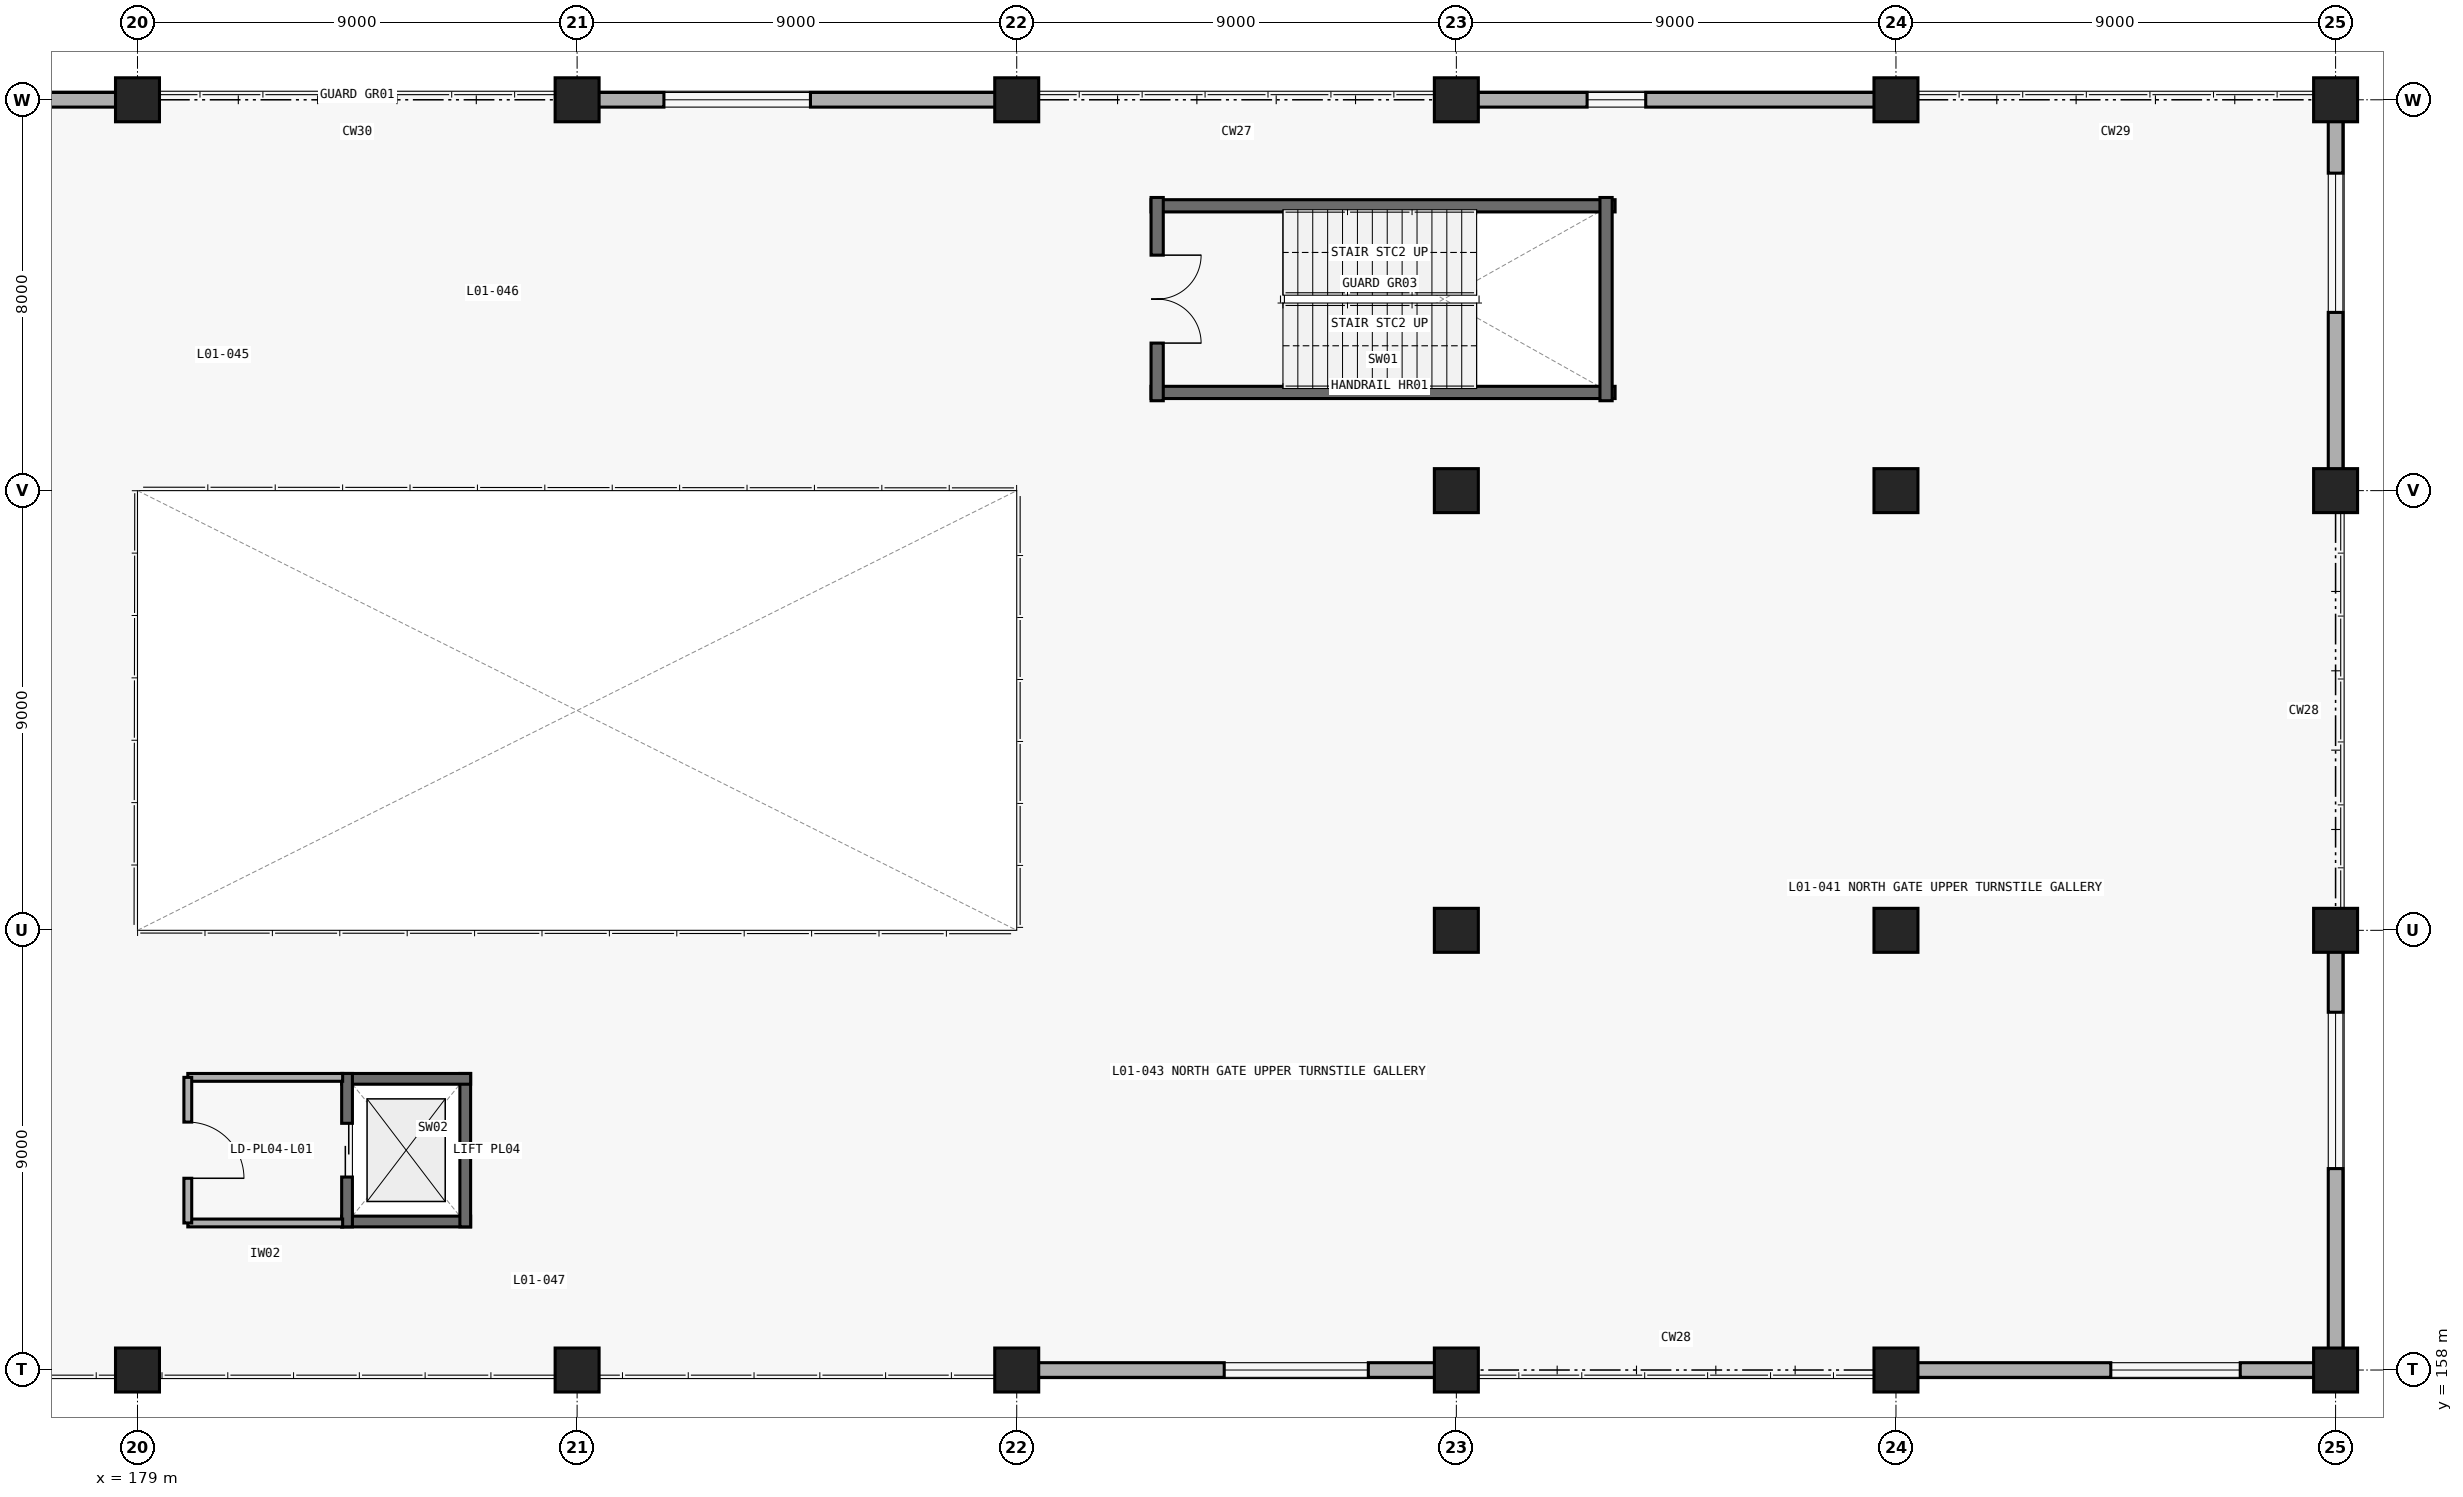
"""IFC4 building model, lengths in metres.
Left out: names, types, materials, properties, quantities, classifications, styles, units other than length and angle.
Written with IfcOpenShell. Run it as: python <this file> out.ifc"""

import sys

from ifc_helpers import new_model, si_unit, direction, frame, frame_2d, origin, origin_2d, place, context, subcontext, project, spatial, rectangle, extrude, element, fill, save


model = new_model("IFC4")
c1 = context("Model", 3, precision=1e-05, world=origin(), true_north=direction((0.0, 1.0)))
c2 = subcontext(c1, "Body", "Model", "MODEL_VIEW")
j1 = project(units=[si_unit("LENGTHUNIT", "METRE"), si_unit("PLANEANGLEUNIT", "RADIAN")], contexts=[c1])
p1 = place(None, origin())
s1 = spatial("IfcSite", under=j1, at=p1, CompositionType="ELEMENT")
p2 = place(p1, origin())
s2 = spatial("IfcBuilding", under=s1, at=p2, CompositionType="ELEMENT")
p3 = place(p2, frame((0.0, 0.0, 5.4)))
s3 = spatial("IfcBuildingStorey", under=s2, at=p3, CompositionType="ELEMENT", Elevation=5.4)
for number, where, z_axis, x_axis in (
    (1, (179.0, 158.0, 0.0), (0.0, 0.0, 1.0), (1.0, 0.0, 0.0)),
    (2, (179.0, 184.0, 0.0), (0.0, 0.0, 1.0), (1.0, 0.0, 0.0)),
    (3, (188.0, 158.0, 0.0), (0.0, 0.0, 1.0), (1.0, 0.0, 0.0)),
    (4, (188.0, 184.0, 0.0), (0.0, 0.0, 1.0), (1.0, 0.0, 0.0)),
    (5, (197.0, 158.0, 0.0), (0.0, 0.0, 1.0), (1.0, 0.0, 0.0)),
    (6, (197.0, 184.0, 0.0), (0.0, 0.0, 1.0), (1.0, 0.0, 0.0)),
    (7, (206.0, 158.0, 0.0), (0.0, 0.0, 1.0), (1.0, 0.0, 0.0)),
    (8, (206.0, 167.0, 0.0), (0.0, 0.0, 1.0), (1.0, 0.0, 0.0)),
    (9, (206.0, 176.0, 0.0), (0.0, 0.0, 1.0), (1.0, 0.0, 0.0)),
    (10, (206.0, 184.0, 0.0), (0.0, 0.0, 1.0), (1.0, 0.0, 0.0)),
    (11, (215.0, 158.0, 0.0), (0.0, 0.0, 1.0), (1.0, 0.0, 0.0)),
    (12, (215.0, 167.0, 0.0), (0.0, 0.0, 1.0), (1.0, 0.0, 0.0)),
    (13, (215.0, 176.0, 0.0), (0.0, 0.0, 1.0), (1.0, 0.0, 0.0)),
    (14, (215.0, 184.0, 0.0), (0.0, 0.0, 1.0), (1.0, 0.0, 0.0)),
    (15, (224.0, 158.0, 0.0), (0.0, 0.0, 1.0), (1.0, 0.0, 0.0)),
    (16, (224.0, 167.0, 0.0), (0.0, 0.0, 1.0), (1.0, 0.0, 0.0)),
    (17, (224.0, 176.0, 0.0), (0.0, 0.0, 1.0), (1.0, 0.0, 0.0)),
    (18, (224.0, 184.0, 0.0), (0.0, 0.0, 1.0), (1.0, 0.0, 0.0)),
):
    element("IfcColumn", number, at=place(p3, frame(where, z_axis=z_axis, x_axis=x_axis)), inside=s3, PredefinedType="COLUMN", context=c2, shape_type="SweptSolid", body=[
        extrude(rectangle(XDim=0.9, YDim=0.9, at=origin_2d()), origin(), (0.0, 0.0, 1.0), 4.8),
    ])
p4 = place(p3, frame((170.425, 184.0, 0.0), z_axis=(0.0, 0.0, 1.0), x_axis=(1.0, 0.0, 0.0)))
e19 = element("IfcWall", 19, at=p4, inside=s3, PredefinedType="STANDARD", context=c2, shape_type="SweptSolid", body=[
    extrude(rectangle(XDim=8.15, YDim=0.3, at=frame_2d((4.075, 0.0))), origin(), (0.0, 0.0, 1.0), 3.804),
])
p5 = place(p4, frame((2.102, 0.0, 0.95)))
e20 = element("IfcOpeningElement", 20, at=p5, cuts=e19, PredefinedType="OPENING", context=c2, shape_type="SweptSolid", body=[
    extrude(rectangle(XDim=1.5, YDim=2.0, at=frame_2d((0.75, 1.0))), frame((0.0, 0.16, 0.0), z_axis=(0.0, -1.0, 0.0), x_axis=(1.0, 0.0, 0.0)), (0.0, 0.0, 1.0), 0.32),
])
p6 = place(p3, frame((188.425, 184.0, 0.0), z_axis=(0.0, 0.0, 1.0), x_axis=(1.0, 0.0, 0.0)))
e21 = element("IfcWall", 21, at=p6, inside=s3, PredefinedType="STANDARD", context=c2, shape_type="SweptSolid", body=[
    extrude(rectangle(XDim=8.15, YDim=0.3, at=frame_2d((4.075, 0.0))), origin(), (0.0, 0.0, 1.0), 3.804),
])
p7 = place(p6, frame((1.352, 0.0, 0.95)))
e22 = element("IfcOpeningElement", 22, at=p7, cuts=e21, PredefinedType="OPENING", context=c2, shape_type="SweptSolid", body=[
    extrude(rectangle(XDim=3.0, YDim=2.3, at=frame_2d((1.5, 1.15))), frame((0.0, 0.16, 0.0), z_axis=(0.0, -1.0, 0.0), x_axis=(1.0, 0.0, 0.0)), (0.0, 0.0, 1.0), 0.32),
])
p8 = place(p3, frame((206.425, 184.0, 0.0), z_axis=(0.0, 0.0, 1.0), x_axis=(1.0, 0.0, 0.0)))
e23 = element("IfcWall", 23, at=p8, inside=s3, PredefinedType="STANDARD", context=c2, shape_type="SweptSolid", body=[
    extrude(rectangle(XDim=8.15, YDim=0.3, at=frame_2d((4.075, 0.0))), origin(), (0.0, 0.0, 1.0), 3.804),
])
p9 = place(p8, frame((2.252, 0.0, 0.95)))
e24 = element("IfcOpeningElement", 24, at=p9, cuts=e23, PredefinedType="OPENING", context=c2, shape_type="SweptSolid", body=[
    extrude(rectangle(XDim=1.2, YDim=1.8, at=frame_2d((0.6, 0.9))), frame((0.0, 0.16, 0.0), z_axis=(0.0, -1.0, 0.0), x_axis=(1.0, 0.0, 0.0)), (0.0, 0.0, 1.0), 0.32),
])
p10 = place(p3, frame((224.0, 183.575, 0.0), z_axis=(0.0, 0.0, 1.0), x_axis=(0.0, -1.0, 0.0)))
e25 = element("IfcWall", 25, at=p10, inside=s3, PredefinedType="STANDARD", context=c2, shape_type="SweptSolid", body=[
    extrude(rectangle(XDim=7.15, YDim=0.3, at=frame_2d((3.575, 0.0))), origin(), (0.0, 0.0, 1.0), 3.837),
])
p11 = place(p10, frame((1.077, 0.0, 0.95)))
e26 = element("IfcOpeningElement", 26, at=p11, cuts=e25, PredefinedType="OPENING", context=c2, shape_type="SweptSolid", body=[
    extrude(rectangle(XDim=2.85, YDim=2.35, at=frame_2d((1.425, 1.175))), frame((0.0, 0.16, 0.0), z_axis=(0.0, -1.0, 0.0), x_axis=(1.0, 0.0, 0.0)), (0.0, 0.0, 1.0), 0.32),
])
p12 = place(p3, frame((224.0, 166.575, 0.0), z_axis=(0.0, 0.0, 1.0), x_axis=(0.0, -1.0, 0.0)))
e27 = element("IfcWall", 27, at=p12, inside=s3, PredefinedType="STANDARD", context=c2, shape_type="SweptSolid", body=[
    extrude(rectangle(XDim=8.15, YDim=0.3, at=frame_2d((4.075, 0.0))), origin(), (0.0, 0.0, 1.0), 3.837),
])
p13 = place(p12, frame((1.252, 0.0, 0.95)))
e28 = element("IfcOpeningElement", 28, at=p13, cuts=e27, PredefinedType="OPENING", context=c2, shape_type="SweptSolid", body=[
    extrude(rectangle(XDim=3.2, YDim=2.1, at=frame_2d((1.6, 1.05))), frame((0.0, 0.16, 0.0), z_axis=(0.0, -1.0, 0.0), x_axis=(1.0, 0.0, 0.0)), (0.0, 0.0, 1.0), 0.32),
])
p14 = place(p3, frame((223.575, 158.0, 0.0), z_axis=(0.0, 0.0, 1.0), x_axis=(-1.0, 0.0, 0.0)))
e29 = element("IfcWall", 29, at=p14, inside=s3, PredefinedType="STANDARD", context=c2, shape_type="SweptSolid", body=[
    extrude(rectangle(XDim=8.15, YDim=0.3, at=frame_2d((4.075, 0.0))), origin(), (0.0, 0.0, 1.0), 3.804),
])
p15 = place(p14, frame((1.527, 0.0, 0.95)))
e30 = element("IfcOpeningElement", 30, at=p15, cuts=e29, PredefinedType="OPENING", context=c2, shape_type="SweptSolid", body=[
    extrude(rectangle(XDim=2.65, YDim=2.15, at=frame_2d((1.325, 1.075))), frame((0.0, 0.16, 0.0), z_axis=(0.0, -1.0, 0.0), x_axis=(1.0, 0.0, 0.0)), (0.0, 0.0, 1.0), 0.32),
])
p16 = place(p3, frame((205.575, 158.0, 0.0), z_axis=(0.0, 0.0, 1.0), x_axis=(-1.0, 0.0, 0.0)))
e31 = element("IfcWall", 31, at=p16, inside=s3, PredefinedType="STANDARD", context=c2, shape_type="SweptSolid", body=[
    extrude(rectangle(XDim=8.15, YDim=0.3, at=frame_2d((4.075, 0.0))), origin(), (0.0, 0.0, 1.0), 3.804),
])
p17 = place(p16, frame((1.377, 0.0, 0.95)))
e32 = element("IfcOpeningElement", 32, at=p17, cuts=e31, PredefinedType="OPENING", context=c2, shape_type="SweptSolid", body=[
    extrude(rectangle(XDim=2.95, YDim=2.2, at=frame_2d((1.475, 1.1))), frame((0.0, 0.16, 0.0), z_axis=(0.0, -1.0, 0.0), x_axis=(1.0, 0.0, 0.0)), (0.0, 0.0, 1.0), 0.32),
])
for number, where, z_axis, x_axis in (
    (33, (199.75, 178.01, 0.0), (0.0, 0.0, 1.0), (1.0, 0.0, 0.0)),
    (34, (209.25, 181.83, 0.0), (0.0, 0.0, 1.0), (-1.0, 0.0, 0.0)),
):
    element("IfcWall", number, at=place(p3, frame(where, z_axis=z_axis, x_axis=x_axis)), inside=s3, PredefinedType="SHEAR", context=c2, shape_type="SweptSolid", body=[
        extrude(rectangle(XDim=9.5, YDim=0.25, at=frame_2d((4.75, 0.0))), origin(), (0.0, 0.0, 1.0), 4.52),
    ])
p18 = place(p3, frame((199.875, 182.0, 0.0), z_axis=(0.0, 0.0, 1.0), x_axis=(0.0, -1.0, 0.0)))
e35 = element("IfcWall", 35, at=p18, inside=s3, PredefinedType="SHEAR", context=c2, shape_type="SweptSolid", body=[
    extrude(rectangle(XDim=4.16, YDim=0.25, at=frame_2d((2.08, 0.0))), origin(), (0.0, 0.0, 1.0), 4.52),
])
p19 = place(p18, frame((1.18, 0.0, 0.0)))
e36 = element("IfcOpeningElement", 36, at=p19, cuts=e35, PredefinedType="OPENING", context=c2, shape_type="SweptSolid", body=[
    extrude(rectangle(XDim=1.8, YDim=2.25, at=frame_2d((0.9, 1.125))), frame((0.0, 0.135, 0.0), z_axis=(0.0, -1.0, 0.0), x_axis=(1.0, 0.0, 0.0)), (0.0, 0.0, 1.0), 0.27),
])
p20 = place(p3, frame((209.065, 177.84, 0.0), z_axis=(0.0, 0.0, 1.0), x_axis=(0.0, 1.0, 0.0)))
e37 = element("IfcWall", 37, at=p20, inside=s3, PredefinedType="SHEAR", context=c2, shape_type="SweptSolid", body=[
    extrude(rectangle(XDim=4.16, YDim=0.25, at=frame_2d((2.08, 0.0))), origin(), (0.0, 0.0, 1.0), 4.52),
])
p21 = place(p3, frame((183.18, 161.04, 0.0), z_axis=(0.0, 0.0, 1.0), x_axis=(1.0, 0.0, 0.0)))
e38 = element("IfcWall", 38, at=p21, inside=s3, PredefinedType="SHEAR", context=c2, shape_type="SweptSolid", body=[
    extrude(rectangle(XDim=2.64, YDim=0.22, at=frame_2d((1.32, 0.0))), origin(), (0.0, 0.0, 1.0), 4.52),
])
p22 = place(p3, frame((185.71, 160.93, 0.0), z_axis=(0.0, 0.0, 1.0), x_axis=(0.0, 1.0, 0.0)))
e39 = element("IfcWall", 39, at=p22, inside=s3, PredefinedType="SHEAR", context=c2, shape_type="SweptSolid", body=[
    extrude(rectangle(XDim=3.14, YDim=0.22, at=frame_2d((1.57, 0.0))), origin(), (0.0, 0.0, 1.0), 4.52),
])
p23 = place(p3, frame((185.82, 163.96, 0.0), z_axis=(0.0, 0.0, 1.0), x_axis=(-1.0, 0.0, 0.0)))
e40 = element("IfcWall", 40, at=p23, inside=s3, PredefinedType="SHEAR", context=c2, shape_type="SweptSolid", body=[
    extrude(rectangle(XDim=2.64, YDim=0.22, at=frame_2d((1.32, 0.0))), origin(), (0.0, 0.0, 1.0), 4.52),
])
p24 = place(p3, frame((183.29, 164.07, 0.0), z_axis=(0.0, 0.0, 1.0), x_axis=(0.0, -1.0, 0.0)))
e41 = element("IfcWall", 41, at=p24, inside=s3, PredefinedType="SHEAR", context=c2, shape_type="SweptSolid", body=[
    extrude(rectangle(XDim=3.14, YDim=0.22, at=frame_2d((1.57, 0.0))), origin(), (0.0, 0.0, 1.0), 4.52),
])
p25 = place(p24, frame((1.02, 0.0, 0.0)))
e42 = element("IfcOpeningElement", 42, at=p25, cuts=e41, PredefinedType="OPENING", context=c2, shape_type="SweptSolid", body=[
    extrude(rectangle(XDim=1.1, YDim=2.15, at=frame_2d((0.55, 1.075))), frame((0.0, 0.12, 0.0), z_axis=(0.0, -1.0, 0.0), x_axis=(1.0, 0.0, 0.0)), (0.0, 0.0, 1.0), 0.24),
])
for number, where, z_axis, x_axis in (
    (43, (183.2, 163.99, 0.0), (0.0, 0.0, 1.0), (-1.0, 0.0, 0.0)),
    (44, (183.2, 161.01, 0.0), (0.0, 0.0, 1.0), (-1.0, 0.0, 0.0)),
):
    element("IfcWall", number, at=place(p3, frame(where, z_axis=z_axis, x_axis=x_axis)), inside=s3, PredefinedType="PARTITIONING", context=c2, shape_type="SweptSolid", body=[
        extrude(rectangle(XDim=3.17, YDim=0.16, at=frame_2d((1.585, 0.0))), origin(), (0.0, 0.0, 1.0), 4.5),
    ])
p26 = place(p3, frame((180.03, 163.99, 0.0), z_axis=(0.0, 0.0, 1.0), x_axis=(0.0, -1.0, 0.0)))
e45 = element("IfcWall", 45, at=p26, inside=s3, PredefinedType="PARTITIONING", context=c2, shape_type="SweptSolid", body=[
    extrude(rectangle(XDim=2.98, YDim=0.16, at=frame_2d((1.49, 0.0))), origin(), (0.0, 0.0, 1.0), 4.5),
])
p27 = place(p26, frame((0.915, 0.0, 0.0)))
e46 = element("IfcOpeningElement", 46, at=p27, cuts=e45, PredefinedType="OPENING", context=c2, shape_type="SweptSolid", body=[
    extrude(rectangle(XDim=1.15, YDim=2.2, at=frame_2d((0.575, 1.1))), frame((0.0, 0.09, 0.0), z_axis=(0.0, -1.0, 0.0), x_axis=(1.0, 0.0, 0.0)), (0.0, 0.0, 1.0), 0.18),
])
p28 = place(p7, origin())
e47 = element("IfcWindow", 47, at=p28, inside=s3, PartitioningType="SINGLE_PANEL", PredefinedType="WINDOW", context=c2, shape_type="SweptSolid", body=[
    extrude(rectangle(XDim=3.0, YDim=2.3, at=frame_2d((1.5, 1.15))), frame((0.0, 0.03, 0.0), z_axis=(0.0, -1.0, 0.0), x_axis=(1.0, 0.0, 0.0)), (0.0, 0.0, 1.0), 0.06),
])
fill(e22, e47)
p29 = place(p9, origin())
e48 = element("IfcWindow", 48, at=p29, inside=s3, PartitioningType="SINGLE_PANEL", PredefinedType="WINDOW", context=c2, shape_type="SweptSolid", body=[
    extrude(rectangle(XDim=1.2, YDim=1.8, at=frame_2d((0.6, 0.9))), frame((0.0, 0.03, 0.0), z_axis=(0.0, -1.0, 0.0), x_axis=(1.0, 0.0, 0.0)), (0.0, 0.0, 1.0), 0.06),
])
fill(e24, e48)
p30 = place(p11, origin())
e49 = element("IfcWindow", 49, at=p30, inside=s3, PartitioningType="SINGLE_PANEL", PredefinedType="WINDOW", context=c2, shape_type="SweptSolid", body=[
    extrude(rectangle(XDim=2.85, YDim=2.35, at=frame_2d((1.425, 1.175))), frame((0.0, 0.03, 0.0), z_axis=(0.0, -1.0, 0.0), x_axis=(1.0, 0.0, 0.0)), (0.0, 0.0, 1.0), 0.06),
])
fill(e26, e49)
p31 = place(p13, origin())
e50 = element("IfcWindow", 50, at=p31, inside=s3, PartitioningType="SINGLE_PANEL", PredefinedType="WINDOW", context=c2, shape_type="SweptSolid", body=[
    extrude(rectangle(XDim=3.2, YDim=2.1, at=frame_2d((1.6, 1.05))), frame((0.0, 0.03, 0.0), z_axis=(0.0, -1.0, 0.0), x_axis=(1.0, 0.0, 0.0)), (0.0, 0.0, 1.0), 0.06),
])
fill(e28, e50)
p32 = place(p15, origin())
e51 = element("IfcWindow", 51, at=p32, inside=s3, PartitioningType="SINGLE_PANEL", PredefinedType="WINDOW", context=c2, shape_type="SweptSolid", body=[
    extrude(rectangle(XDim=2.65, YDim=2.15, at=frame_2d((1.325, 1.075))), frame((0.0, 0.03, 0.0), z_axis=(0.0, -1.0, 0.0), x_axis=(1.0, 0.0, 0.0)), (0.0, 0.0, 1.0), 0.06),
])
fill(e30, e51)
p33 = place(p17, origin())
e52 = element("IfcWindow", 52, at=p33, inside=s3, PartitioningType="SINGLE_PANEL", PredefinedType="WINDOW", context=c2, shape_type="SweptSolid", body=[
    extrude(rectangle(XDim=2.95, YDim=2.2, at=frame_2d((1.475, 1.1))), frame((0.0, 0.03, 0.0), z_axis=(0.0, -1.0, 0.0), x_axis=(1.0, 0.0, 0.0)), (0.0, 0.0, 1.0), 0.06),
])
fill(e32, e52)
p34 = place(p19, origin())
e53 = element("IfcDoor", 53, at=p34, inside=s3, OperationType="DOUBLE_DOOR_SINGLE_SWING", PredefinedType="DOOR", context=c2, shape_type="SweptSolid", body=[
    extrude(rectangle(XDim=1.8, YDim=2.25, at=frame_2d((0.9, 1.125))), frame((0.0, 0.025, 0.0), z_axis=(0.0, -1.0, 0.0), x_axis=(1.0, 0.0, 0.0)), (0.0, 0.0, 1.0), 0.05),
])
fill(e36, e53)
p35 = place(p25, origin())
e54 = element("IfcDoor", 54, at=p35, inside=s3, OperationType="SLIDING_TO_LEFT", PredefinedType="DOOR", context=c2, shape_type="SweptSolid", body=[
    extrude(rectangle(XDim=1.1, YDim=2.15, at=frame_2d((0.55, 1.075))), frame((0.0, 0.025, 0.0), z_axis=(0.0, -1.0, 0.0), x_axis=(1.0, 0.0, 0.0)), (0.0, 0.0, 1.0), 0.05),
])
fill(e42, e54)
p36 = place(p27, origin())
e55 = element("IfcDoor", 55, at=p36, inside=s3, OperationType="SINGLE_SWING_RIGHT", PredefinedType="DOOR", context=c2, shape_type="SweptSolid", body=[
    extrude(rectangle(XDim=1.15, YDim=2.2, at=frame_2d((0.575, 1.1))), frame((0.0, 0.025, 0.0), z_axis=(0.0, -1.0, 0.0), x_axis=(1.0, 0.0, 0.0)), (0.0, 0.0, 1.0), 0.05),
])
fill(e46, e55)
save(model, sys.argv[1])
